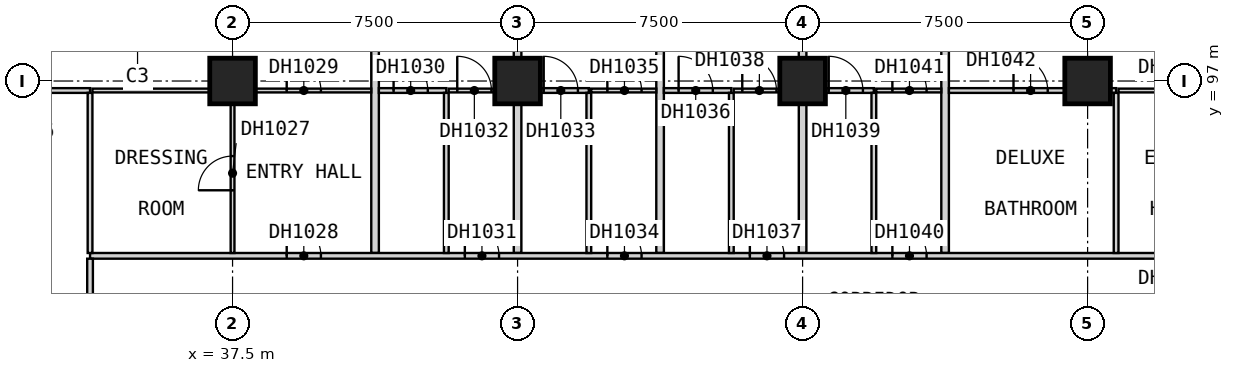
"""IFC4 building model, lengths in metres.
Left out: names, types, materials, properties, quantities, classifications, styles, units other than length and angle.
Written with IfcOpenShell. Run it as: python <this file> out.ifc"""

import sys

from ifc_helpers import new_model, si_unit, direction, frame, frame_2d, origin, origin_2d, place, context, subcontext, project, spatial, rectangle, extrude, element, fill, save


model = new_model("IFC4")
c1 = context("Model", 3, precision=1e-05, world=origin(), true_north=direction((0.0, 1.0)))
c2 = subcontext(c1, "Body", "Model", "MODEL_VIEW")
j1 = project(units=[si_unit("LENGTHUNIT", "METRE"), si_unit("PLANEANGLEUNIT", "RADIAN")], contexts=[c1])
p1 = place(None, origin())
s1 = spatial("IfcSite", under=j1, at=p1, CompositionType="ELEMENT")
p2 = place(p1, origin())
s2 = spatial("IfcBuilding", under=s1, at=p2, CompositionType="ELEMENT")
p3 = place(p2, frame((0.0, 0.0, 34.0)))
s3 = spatial("IfcBuildingStorey", under=s2, at=p3, CompositionType="ELEMENT", Elevation=34.0)
for number, where, z_axis, x_axis in (
    (1, (37.5, 97.0, 0.0), (0.0, 0.0, 1.0), (1.0, 0.0, 0.0)),
    (2, (45.0, 97.0, 0.0), (0.0, 0.0, 1.0), (1.0, 0.0, 0.0)),
    (3, (52.5, 97.0, 0.0), (0.0, 0.0, 1.0), (1.0, 0.0, 0.0)),
    (4, (60.0, 97.0, 0.0), (0.0, 0.0, 1.0), (1.0, 0.0, 0.0)),
):
    element("IfcColumn", number, at=place(p3, frame(where, z_axis=z_axis, x_axis=x_axis)), inside=s3, PredefinedType="COLUMN", context=c2, shape_type="SweptSolid", body=[
        extrude(rectangle(XDim=1.2, YDim=1.2, at=origin_2d()), origin(), (0.0, 0.0, 1.0), 3.6),
    ])
p4 = place(p3, frame((41.25, 92.475, 0.0), z_axis=(0.0, 0.0, 1.0), x_axis=(0.0, 1.0, 0.0)))
e5 = element("IfcWall", 5, at=p4, inside=s3, PredefinedType="PARTITIONING", context=c2, shape_type="SweptSolid", body=[
    extrude(rectangle(XDim=11.715, YDim=0.2, at=frame_2d((5.857, 0.0))), origin(), (0.0, 0.0, 1.0), 3.35),
])
p5 = place(p3, frame((45.0, 92.475, 0.0), z_axis=(0.0, 0.0, 1.0), x_axis=(0.0, 1.0, 0.0)))
e6 = element("IfcWall", 6, at=p5, inside=s3, PredefinedType="PARTITIONING", context=c2, shape_type="SweptSolid", body=[
    extrude(rectangle(XDim=12.525, YDim=0.2, at=frame_2d((6.262, 0.0))), origin(), (0.0, 0.0, 1.0), 3.35),
])
p6 = place(p3, frame((48.75, 92.475, 0.0), z_axis=(0.0, 0.0, 1.0), x_axis=(0.0, 1.0, 0.0)))
e7 = element("IfcWall", 7, at=p6, inside=s3, PredefinedType="PARTITIONING", context=c2, shape_type="SweptSolid", body=[
    extrude(rectangle(XDim=11.715, YDim=0.2, at=frame_2d((5.857, 0.0))), origin(), (0.0, 0.0, 1.0), 3.35),
])
p7 = place(p3, frame((52.5, 92.475, 0.0), z_axis=(0.0, 0.0, 1.0), x_axis=(0.0, 1.0, 0.0)))
e8 = element("IfcWall", 8, at=p7, inside=s3, PredefinedType="PARTITIONING", context=c2, shape_type="SweptSolid", body=[
    extrude(rectangle(XDim=12.525, YDim=0.2, at=frame_2d((6.262, 0.0))), origin(), (0.0, 0.0, 1.0), 3.35),
])
p8 = place(p3, frame((56.25, 92.475, 0.0), z_axis=(0.0, 0.0, 1.0), x_axis=(0.0, 1.0, 0.0)))
e9 = element("IfcWall", 9, at=p8, inside=s3, PredefinedType="PARTITIONING", context=c2, shape_type="SweptSolid", body=[
    extrude(rectangle(XDim=11.715, YDim=0.2, at=frame_2d((5.857, 0.0))), origin(), (0.0, 0.0, 1.0), 3.35),
])
p9 = place(p3, frame((33.75, 92.4, 0.0), z_axis=(0.0, 0.0, 1.0), x_axis=(1.0, 0.0, 0.0)))
e10 = element("IfcWall", 10, at=p9, inside=s3, PredefinedType="PARTITIONING", context=c2, shape_type="SweptSolid", body=[
    extrude(rectangle(XDim=43.65, YDim=0.15, at=frame_2d((21.825, 0.0))), origin(), (0.0, 0.0, 1.0), 3.35),
])
p10 = place(p9, frame((5.175, 0.0, 0.0)))
e11 = element("IfcOpeningElement", 11, at=p10, cuts=e10, PredefinedType="OPENING", context=c2, shape_type="SweptSolid", body=[
    extrude(rectangle(XDim=0.9, YDim=2.1, at=frame_2d((0.45, 1.05))), frame((0.0, 0.085, 0.0), z_axis=(0.0, -1.0, 0.0), x_axis=(1.0, 0.0, 0.0)), (0.0, 0.0, 1.0), 0.17),
])
p11 = place(p9, frame((9.863, 0.0, 0.0)))
e12 = element("IfcOpeningElement", 12, at=p11, cuts=e10, PredefinedType="OPENING", context=c2, shape_type="SweptSolid", body=[
    extrude(rectangle(XDim=0.9, YDim=2.1, at=frame_2d((0.45, 1.05))), frame((0.0, 0.085, 0.0), z_axis=(0.0, -1.0, 0.0), x_axis=(1.0, 0.0, 0.0)), (0.0, 0.0, 1.0), 0.17),
])
p12 = place(p9, frame((13.613, 0.0, 0.0)))
e13 = element("IfcOpeningElement", 13, at=p12, cuts=e10, PredefinedType="OPENING", context=c2, shape_type="SweptSolid", body=[
    extrude(rectangle(XDim=0.9, YDim=2.1, at=frame_2d((0.45, 1.05))), frame((0.0, 0.085, 0.0), z_axis=(0.0, -1.0, 0.0), x_axis=(1.0, 0.0, 0.0)), (0.0, 0.0, 1.0), 0.17),
])
p13 = place(p9, frame((17.363, 0.0, 0.0)))
e14 = element("IfcOpeningElement", 14, at=p13, cuts=e10, PredefinedType="OPENING", context=c2, shape_type="SweptSolid", body=[
    extrude(rectangle(XDim=0.9, YDim=2.1, at=frame_2d((0.45, 1.05))), frame((0.0, 0.085, 0.0), z_axis=(0.0, -1.0, 0.0), x_axis=(1.0, 0.0, 0.0)), (0.0, 0.0, 1.0), 0.17),
])
p14 = place(p9, frame((21.113, 0.0, 0.0)))
e15 = element("IfcOpeningElement", 15, at=p14, cuts=e10, PredefinedType="OPENING", context=c2, shape_type="SweptSolid", body=[
    extrude(rectangle(XDim=0.9, YDim=2.1, at=frame_2d((0.45, 1.05))), frame((0.0, 0.085, 0.0), z_axis=(0.0, -1.0, 0.0), x_axis=(1.0, 0.0, 0.0)), (0.0, 0.0, 1.0), 0.17),
])
p15 = place(p9, frame((28.05, 0.0, 0.0)))
e16 = element("IfcOpeningElement", 16, at=p15, cuts=e10, PredefinedType="OPENING", context=c2, shape_type="SweptSolid", body=[
    extrude(rectangle(XDim=0.9, YDim=2.1, at=frame_2d((0.45, 1.05))), frame((0.0, 0.085, 0.0), z_axis=(0.0, -1.0, 0.0), x_axis=(1.0, 0.0, 0.0)), (0.0, 0.0, 1.0), 0.17),
])
p16 = place(p9, frame((32.363, 0.0, 0.0)))
e17 = element("IfcOpeningElement", 17, at=p16, cuts=e10, PredefinedType="OPENING", context=c2, shape_type="SweptSolid", body=[
    extrude(rectangle(XDim=0.9, YDim=2.1, at=frame_2d((0.45, 1.05))), frame((0.0, 0.085, 0.0), z_axis=(0.0, -1.0, 0.0), x_axis=(1.0, 0.0, 0.0)), (0.0, 0.0, 1.0), 0.17),
])
p17 = place(p9, frame((39.3, 0.0, 0.0)))
e18 = element("IfcOpeningElement", 18, at=p17, cuts=e10, PredefinedType="OPENING", context=c2, shape_type="SweptSolid", body=[
    extrude(rectangle(XDim=0.9, YDim=2.1, at=frame_2d((0.45, 1.05))), frame((0.0, 0.085, 0.0), z_axis=(0.0, -1.0, 0.0), x_axis=(1.0, 0.0, 0.0)), (0.0, 0.0, 1.0), 0.17),
])
p18 = place(p9, frame((42.0, 0.0, 0.0)))
e19 = element("IfcOpeningElement", 19, at=p18, cuts=e10, PredefinedType="OPENING", context=c2, shape_type="SweptSolid", body=[
    extrude(rectangle(XDim=0.9, YDim=2.1, at=frame_2d((0.45, 1.05))), frame((0.0, 0.085, 0.0), z_axis=(0.0, -1.0, 0.0), x_axis=(1.0, 0.0, 0.0)), (0.0, 0.0, 1.0), 0.17),
])
p19 = place(p3, frame((33.75, 90.1, 0.0), z_axis=(0.0, 0.0, 1.0), x_axis=(0.0, 1.0, 0.0)))
e20 = element("IfcWall", 20, at=p19, inside=s3, PredefinedType="PARTITIONING", context=c2, shape_type="SweptSolid", body=[
    extrude(rectangle(XDim=2.225, YDim=0.15, at=frame_2d((1.112, 0.0))), origin(), (0.0, 0.0, 1.0), 3.35),
])
p20 = place(p3, frame((33.812, 96.75, 0.0), z_axis=(0.0, 0.0, 1.0), x_axis=(1.0, 0.0, 0.0)))
e21 = element("IfcWall", 21, at=p20, inside=s3, PredefinedType="PARTITIONING", context=c2, shape_type="SweptSolid", body=[
    extrude(rectangle(XDim=7.337, YDim=0.1, at=frame_2d((3.669, 0.0))), origin(), (0.0, 0.0, 1.0), 3.35),
])
p21 = place(p20, frame((5.113, 0.0, 0.0)))
e22 = element("IfcOpeningElement", 22, at=p21, cuts=e21, PredefinedType="OPENING", context=c2, shape_type="SweptSolid", body=[
    extrude(rectangle(XDim=0.9, YDim=2.1, at=frame_2d((0.45, 1.05))), frame((0.0, 0.06, 0.0), z_axis=(0.0, -1.0, 0.0), x_axis=(1.0, 0.0, 0.0)), (0.0, 0.0, 1.0), 0.12),
])
p22 = place(p3, frame((43.188, 96.75, 0.0), z_axis=(0.0, 0.0, 1.0), x_axis=(1.0, 0.0, 0.0)))
e23 = element("IfcWall", 23, at=p22, inside=s3, PredefinedType="PARTITIONING", context=c2, shape_type="SweptSolid", body=[
    extrude(rectangle(XDim=1.712, YDim=0.1, at=frame_2d((0.856, 0.0))), origin(), (0.0, 0.0, 1.0), 3.35),
])
p23 = place(p22, frame((0.225, 0.0, 0.0)))
e24 = element("IfcOpeningElement", 24, at=p23, cuts=e23, PredefinedType="OPENING", context=c2, shape_type="SweptSolid", body=[
    extrude(rectangle(XDim=0.9, YDim=2.1, at=frame_2d((0.45, 1.05))), frame((0.0, 0.06, 0.0), z_axis=(0.0, -1.0, 0.0), x_axis=(1.0, 0.0, 0.0)), (0.0, 0.0, 1.0), 0.12),
])
p24 = place(p3, frame((46.938, 96.75, 0.0), z_axis=(0.0, 0.0, 1.0), x_axis=(1.0, 0.0, 0.0)))
e25 = element("IfcWall", 25, at=p24, inside=s3, PredefinedType="PARTITIONING", context=c2, shape_type="SweptSolid", body=[
    extrude(rectangle(XDim=1.712, YDim=0.1, at=frame_2d((0.856, 0.0))), origin(), (0.0, 0.0, 1.0), 3.35),
])
p25 = place(p24, frame((0.425, 0.0, 0.0)))
e26 = element("IfcOpeningElement", 26, at=p25, cuts=e25, PredefinedType="OPENING", context=c2, shape_type="SweptSolid", body=[
    extrude(rectangle(XDim=0.9, YDim=2.1, at=frame_2d((0.45, 1.05))), frame((0.0, 0.06, 0.0), z_axis=(0.0, -1.0, 0.0), x_axis=(1.0, 0.0, 0.0)), (0.0, 0.0, 1.0), 0.12),
])
p26 = place(p3, frame((50.688, 96.75, 0.0), z_axis=(0.0, 0.0, 1.0), x_axis=(1.0, 0.0, 0.0)))
e27 = element("IfcWall", 27, at=p26, inside=s3, PredefinedType="PARTITIONING", context=c2, shape_type="SweptSolid", body=[
    extrude(rectangle(XDim=1.712, YDim=0.1, at=frame_2d((0.856, 0.0))), origin(), (0.0, 0.0, 1.0), 3.35),
])
p27 = place(p26, frame((0.225, 0.0, 0.0)))
e28 = element("IfcOpeningElement", 28, at=p27, cuts=e27, PredefinedType="OPENING", context=c2, shape_type="SweptSolid", body=[
    extrude(rectangle(XDim=0.9, YDim=2.1, at=frame_2d((0.45, 1.05))), frame((0.0, 0.06, 0.0), z_axis=(0.0, -1.0, 0.0), x_axis=(1.0, 0.0, 0.0)), (0.0, 0.0, 1.0), 0.12),
])
p28 = place(p3, frame((54.438, 96.75, 0.0), z_axis=(0.0, 0.0, 1.0), x_axis=(1.0, 0.0, 0.0)))
e29 = element("IfcWall", 29, at=p28, inside=s3, PredefinedType="PARTITIONING", context=c2, shape_type="SweptSolid", body=[
    extrude(rectangle(XDim=1.712, YDim=0.1, at=frame_2d((0.856, 0.0))), origin(), (0.0, 0.0, 1.0), 3.35),
])
p29 = place(p28, frame((0.425, 0.0, 0.0)))
e30 = element("IfcOpeningElement", 30, at=p29, cuts=e29, PredefinedType="OPENING", context=c2, shape_type="SweptSolid", body=[
    extrude(rectangle(XDim=0.9, YDim=2.1, at=frame_2d((0.45, 1.05))), frame((0.0, 0.06, 0.0), z_axis=(0.0, -1.0, 0.0), x_axis=(1.0, 0.0, 0.0)), (0.0, 0.0, 1.0), 0.12),
])
p30 = place(p3, frame((60.812, 96.75, 0.0), z_axis=(0.0, 0.0, 1.0), x_axis=(1.0, 0.0, 0.0)))
e31 = element("IfcWall", 31, at=p30, inside=s3, PredefinedType="PARTITIONING", context=c2, shape_type="SweptSolid", body=[
    extrude(rectangle(XDim=2.837, YDim=0.1, at=frame_2d((1.419, 0.0))), origin(), (0.0, 0.0, 1.0), 3.35),
])
p31 = place(p30, frame((0.988, 0.0, 0.0)))
e32 = element("IfcOpeningElement", 32, at=p31, cuts=e31, PredefinedType="OPENING", context=c2, shape_type="SweptSolid", body=[
    extrude(rectangle(XDim=0.9, YDim=2.1, at=frame_2d((0.45, 1.05))), frame((0.0, 0.06, 0.0), z_axis=(0.0, -1.0, 0.0), x_axis=(1.0, 0.0, 0.0)), (0.0, 0.0, 1.0), 0.12),
])
p32 = place(p3, frame((37.5, 92.475, 0.0), z_axis=(0.0, 0.0, 1.0), x_axis=(0.0, 1.0, 0.0)))
e33 = element("IfcWall", 33, at=p32, inside=s3, PredefinedType="PARTITIONING", context=c2, shape_type="SweptSolid", body=[
    extrude(rectangle(XDim=4.225, YDim=0.1, at=frame_2d((2.112, 0.0))), origin(), (0.0, 0.0, 1.0), 3.35),
])
p33 = place(p32, frame((1.65, 0.0, 0.0)))
e34 = element("IfcOpeningElement", 34, at=p33, cuts=e33, PredefinedType="OPENING", context=c2, shape_type="SweptSolid", body=[
    extrude(rectangle(XDim=0.9, YDim=2.1, at=frame_2d((0.45, 1.05))), frame((0.0, 0.06, 0.0), z_axis=(0.0, -1.0, 0.0), x_axis=(1.0, 0.0, 0.0)), (0.0, 0.0, 1.0), 0.12),
])
p34 = place(p3, frame((30.0, 96.75, 0.0), z_axis=(0.0, 0.0, 1.0), x_axis=(1.0, 0.0, 0.0)))
e35 = element("IfcWall", 35, at=p34, inside=s3, PredefinedType="PARTITIONING", context=c2, shape_type="SweptSolid", body=[
    extrude(rectangle(XDim=3.75, YDim=0.125, at=frame_2d((1.875, 0.0))), origin(), (0.0, 0.0, 1.0), 3.35),
])
p35 = place(p34, frame((1.425, 0.0, 0.0)))
e36 = element("IfcOpeningElement", 36, at=p35, cuts=e35, PredefinedType="OPENING", context=c2, shape_type="SweptSolid", body=[
    extrude(rectangle(XDim=0.9, YDim=2.1, at=frame_2d((0.45, 1.05))), frame((0.0, 0.073, 0.0), z_axis=(0.0, -1.0, 0.0), x_axis=(1.0, 0.0, 0.0)), (0.0, 0.0, 1.0), 0.145),
])
p36 = place(p3, frame((41.35, 96.75, 0.0), z_axis=(0.0, 0.0, 1.0), x_axis=(1.0, 0.0, 0.0)))
e37 = element("IfcWall", 37, at=p36, inside=s3, PredefinedType="PARTITIONING", context=c2, shape_type="SweptSolid", body=[
    extrude(rectangle(XDim=1.775, YDim=0.125, at=frame_2d((0.887, 0.0))), origin(), (0.0, 0.0, 1.0), 3.35),
])
p37 = place(p36, frame((0.387, 0.0, 0.0)))
e38 = element("IfcOpeningElement", 38, at=p37, cuts=e37, PredefinedType="OPENING", context=c2, shape_type="SweptSolid", body=[
    extrude(rectangle(XDim=0.9, YDim=2.1, at=frame_2d((0.45, 1.05))), frame((0.0, 0.073, 0.0), z_axis=(0.0, -1.0, 0.0), x_axis=(1.0, 0.0, 0.0)), (0.0, 0.0, 1.0), 0.145),
])
p38 = place(p3, frame((45.1, 96.75, 0.0), z_axis=(0.0, 0.0, 1.0), x_axis=(1.0, 0.0, 0.0)))
e39 = element("IfcWall", 39, at=p38, inside=s3, PredefinedType="PARTITIONING", context=c2, shape_type="SweptSolid", body=[
    extrude(rectangle(XDim=1.775, YDim=0.125, at=frame_2d((0.887, 0.0))), origin(), (0.0, 0.0, 1.0), 3.35),
])
p39 = place(p38, frame((0.587, 0.0, 0.0)))
e40 = element("IfcOpeningElement", 40, at=p39, cuts=e39, PredefinedType="OPENING", context=c2, shape_type="SweptSolid", body=[
    extrude(rectangle(XDim=0.9, YDim=2.1, at=frame_2d((0.45, 1.05))), frame((0.0, 0.073, 0.0), z_axis=(0.0, -1.0, 0.0), x_axis=(1.0, 0.0, 0.0)), (0.0, 0.0, 1.0), 0.145),
])
p40 = place(p3, frame((48.85, 96.75, 0.0), z_axis=(0.0, 0.0, 1.0), x_axis=(1.0, 0.0, 0.0)))
e41 = element("IfcWall", 41, at=p40, inside=s3, PredefinedType="PARTITIONING", context=c2, shape_type="SweptSolid", body=[
    extrude(rectangle(XDim=1.775, YDim=0.125, at=frame_2d((0.887, 0.0))), origin(), (0.0, 0.0, 1.0), 3.35),
])
p41 = place(p40, frame((0.387, 0.0, 0.0)))
e42 = element("IfcOpeningElement", 42, at=p41, cuts=e41, PredefinedType="OPENING", context=c2, shape_type="SweptSolid", body=[
    extrude(rectangle(XDim=0.9, YDim=2.1, at=frame_2d((0.45, 1.05))), frame((0.0, 0.073, 0.0), z_axis=(0.0, -1.0, 0.0), x_axis=(1.0, 0.0, 0.0)), (0.0, 0.0, 1.0), 0.145),
])
p42 = place(p3, frame((52.6, 96.75, 0.0), z_axis=(0.0, 0.0, 1.0), x_axis=(1.0, 0.0, 0.0)))
e43 = element("IfcWall", 43, at=p42, inside=s3, PredefinedType="PARTITIONING", context=c2, shape_type="SweptSolid", body=[
    extrude(rectangle(XDim=1.775, YDim=0.125, at=frame_2d((0.887, 0.0))), origin(), (0.0, 0.0, 1.0), 3.35),
])
p43 = place(p42, frame((0.587, 0.0, 0.0)))
e44 = element("IfcOpeningElement", 44, at=p43, cuts=e43, PredefinedType="OPENING", context=c2, shape_type="SweptSolid", body=[
    extrude(rectangle(XDim=0.9, YDim=2.1, at=frame_2d((0.45, 1.05))), frame((0.0, 0.073, 0.0), z_axis=(0.0, -1.0, 0.0), x_axis=(1.0, 0.0, 0.0)), (0.0, 0.0, 1.0), 0.145),
])
p44 = place(p3, frame((56.35, 96.75, 0.0), z_axis=(0.0, 0.0, 1.0), x_axis=(1.0, 0.0, 0.0)))
e45 = element("IfcWall", 45, at=p44, inside=s3, PredefinedType="PARTITIONING", context=c2, shape_type="SweptSolid", body=[
    extrude(rectangle(XDim=4.4, YDim=0.125, at=frame_2d((2.2, 0.0))), origin(), (0.0, 0.0, 1.0), 3.35),
])
p45 = place(p44, frame((1.7, 0.0, 0.0)))
e46 = element("IfcOpeningElement", 46, at=p45, cuts=e45, PredefinedType="OPENING", context=c2, shape_type="SweptSolid", body=[
    extrude(rectangle(XDim=0.9, YDim=2.1, at=frame_2d((0.45, 1.05))), frame((0.0, 0.073, 0.0), z_axis=(0.0, -1.0, 0.0), x_axis=(1.0, 0.0, 0.0)), (0.0, 0.0, 1.0), 0.145),
])
for number, where, z_axis, x_axis in (
    (47, (33.75, 92.475, 0.0), (0.0, 0.0, 1.0), (0.0, 1.0, 0.0)),
    (48, (43.125, 92.475, 0.0), (0.0, 0.0, 1.0), (0.0, 1.0, 0.0)),
    (49, (46.875, 92.475, 0.0), (0.0, 0.0, 1.0), (0.0, 1.0, 0.0)),
    (50, (50.625, 92.475, 0.0), (0.0, 0.0, 1.0), (0.0, 1.0, 0.0)),
    (51, (54.375, 92.475, 0.0), (0.0, 0.0, 1.0), (0.0, 1.0, 0.0)),
    (52, (60.75, 92.475, 0.0), (0.0, 0.0, 1.0), (0.0, 1.0, 0.0)),
):
    element("IfcWall", number, at=place(p3, frame(where, z_axis=z_axis, x_axis=x_axis)), inside=s3, PredefinedType="PARTITIONING", context=c2, shape_type="SweptSolid", body=[
        extrude(rectangle(XDim=4.212, YDim=0.125, at=frame_2d((2.106, 0.0))), origin(), (0.0, 0.0, 1.0), 3.35),
    ])
p46 = place(p33, origin())
e53 = element("IfcDoor", 53, at=p46, inside=s3, OperationType="SINGLE_SWING_RIGHT", PredefinedType="DOOR", context=c2, shape_type="SweptSolid", body=[
    extrude(rectangle(XDim=0.9, YDim=2.1, at=frame_2d((0.45, 1.05))), frame((0.0, 0.025, 0.0), z_axis=(0.0, -1.0, 0.0), x_axis=(1.0, 0.0, 0.0)), (0.0, 0.0, 1.0), 0.05),
])
fill(e34, e53)
p47 = place(p10, origin())
e54 = element("IfcDoor", 54, at=p47, inside=s3, OperationType="SINGLE_SWING_LEFT", PredefinedType="DOOR", context=c2, shape_type="SweptSolid", body=[
    extrude(rectangle(XDim=0.9, YDim=2.1, at=frame_2d((0.45, 1.05))), frame((0.0, 0.025, 0.0), z_axis=(0.0, -1.0, 0.0), x_axis=(1.0, 0.0, 0.0)), (0.0, 0.0, 1.0), 0.05),
])
fill(e11, e54)
p48 = place(p21, origin())
e55 = element("IfcDoor", 55, at=p48, inside=s3, OperationType="SINGLE_SWING_RIGHT", PredefinedType="DOOR", context=c2, shape_type="SweptSolid", body=[
    extrude(rectangle(XDim=0.9, YDim=2.1, at=frame_2d((0.45, 1.05))), frame((0.0, 0.025, 0.0), z_axis=(0.0, -1.0, 0.0), x_axis=(1.0, 0.0, 0.0)), (0.0, 0.0, 1.0), 0.05),
])
fill(e22, e55)
p49 = place(p37, origin())
e56 = element("IfcDoor", 56, at=p49, inside=s3, OperationType="SINGLE_SWING_RIGHT", PredefinedType="DOOR", context=c2, shape_type="SweptSolid", body=[
    extrude(rectangle(XDim=0.9, YDim=2.1, at=frame_2d((0.45, 1.05))), frame((0.0, 0.025, 0.0), z_axis=(0.0, -1.0, 0.0), x_axis=(1.0, 0.0, 0.0)), (0.0, 0.0, 1.0), 0.05),
])
fill(e38, e56)
p50 = place(p11, origin())
e57 = element("IfcDoor", 57, at=p50, inside=s3, OperationType="SINGLE_SWING_LEFT", PredefinedType="DOOR", context=c2, shape_type="SweptSolid", body=[
    extrude(rectangle(XDim=0.9, YDim=2.1, at=frame_2d((0.45, 1.05))), frame((0.0, 0.025, 0.0), z_axis=(0.0, -1.0, 0.0), x_axis=(1.0, 0.0, 0.0)), (0.0, 0.0, 1.0), 0.05),
])
fill(e12, e57)
p51 = place(p23, origin())
e58 = element("IfcDoor", 58, at=p51, inside=s3, OperationType="SINGLE_SWING_RIGHT", PredefinedType="DOOR", context=c2, shape_type="SweptSolid", body=[
    extrude(rectangle(XDim=0.9, YDim=2.1, at=frame_2d((0.45, 1.05))), frame((0.0, 0.025, 0.0), z_axis=(0.0, -1.0, 0.0), x_axis=(1.0, 0.0, 0.0)), (0.0, 0.0, 1.0), 0.05),
])
fill(e24, e58)
p52 = place(p39, origin())
e59 = element("IfcDoor", 59, at=p52, inside=s3, OperationType="SINGLE_SWING_LEFT", PredefinedType="DOOR", context=c2, shape_type="SweptSolid", body=[
    extrude(rectangle(XDim=0.9, YDim=2.1, at=frame_2d((0.45, 1.05))), frame((0.0, 0.025, 0.0), z_axis=(0.0, -1.0, 0.0), x_axis=(1.0, 0.0, 0.0)), (0.0, 0.0, 1.0), 0.05),
])
fill(e40, e59)
p53 = place(p12, origin())
e60 = element("IfcDoor", 60, at=p53, inside=s3, OperationType="SINGLE_SWING_LEFT", PredefinedType="DOOR", context=c2, shape_type="SweptSolid", body=[
    extrude(rectangle(XDim=0.9, YDim=2.1, at=frame_2d((0.45, 1.05))), frame((0.0, 0.025, 0.0), z_axis=(0.0, -1.0, 0.0), x_axis=(1.0, 0.0, 0.0)), (0.0, 0.0, 1.0), 0.05),
])
fill(e13, e60)
p54 = place(p25, origin())
e61 = element("IfcDoor", 61, at=p54, inside=s3, OperationType="SINGLE_SWING_RIGHT", PredefinedType="DOOR", context=c2, shape_type="SweptSolid", body=[
    extrude(rectangle(XDim=0.9, YDim=2.1, at=frame_2d((0.45, 1.05))), frame((0.0, 0.025, 0.0), z_axis=(0.0, -1.0, 0.0), x_axis=(1.0, 0.0, 0.0)), (0.0, 0.0, 1.0), 0.05),
])
fill(e26, e61)
p55 = place(p41, origin())
e62 = element("IfcDoor", 62, at=p55, inside=s3, OperationType="SINGLE_SWING_RIGHT", PredefinedType="DOOR", context=c2, shape_type="SweptSolid", body=[
    extrude(rectangle(XDim=0.9, YDim=2.1, at=frame_2d((0.45, 1.05))), frame((0.0, 0.025, 0.0), z_axis=(0.0, -1.0, 0.0), x_axis=(1.0, 0.0, 0.0)), (0.0, 0.0, 1.0), 0.05),
])
fill(e42, e62)
p56 = place(p13, origin())
e63 = element("IfcDoor", 63, at=p56, inside=s3, OperationType="SINGLE_SWING_LEFT", PredefinedType="DOOR", context=c2, shape_type="SweptSolid", body=[
    extrude(rectangle(XDim=0.9, YDim=2.1, at=frame_2d((0.45, 1.05))), frame((0.0, 0.025, 0.0), z_axis=(0.0, -1.0, 0.0), x_axis=(1.0, 0.0, 0.0)), (0.0, 0.0, 1.0), 0.05),
])
fill(e14, e63)
p57 = place(p27, origin())
e64 = element("IfcDoor", 64, at=p57, inside=s3, OperationType="SINGLE_SWING_RIGHT", PredefinedType="DOOR", context=c2, shape_type="SweptSolid", body=[
    extrude(rectangle(XDim=0.9, YDim=2.1, at=frame_2d((0.45, 1.05))), frame((0.0, 0.025, 0.0), z_axis=(0.0, -1.0, 0.0), x_axis=(1.0, 0.0, 0.0)), (0.0, 0.0, 1.0), 0.05),
])
fill(e28, e64)
p58 = place(p43, origin())
e65 = element("IfcDoor", 65, at=p58, inside=s3, OperationType="SINGLE_SWING_LEFT", PredefinedType="DOOR", context=c2, shape_type="SweptSolid", body=[
    extrude(rectangle(XDim=0.9, YDim=2.1, at=frame_2d((0.45, 1.05))), frame((0.0, 0.025, 0.0), z_axis=(0.0, -1.0, 0.0), x_axis=(1.0, 0.0, 0.0)), (0.0, 0.0, 1.0), 0.05),
])
fill(e44, e65)
p59 = place(p14, origin())
e66 = element("IfcDoor", 66, at=p59, inside=s3, OperationType="SINGLE_SWING_LEFT", PredefinedType="DOOR", context=c2, shape_type="SweptSolid", body=[
    extrude(rectangle(XDim=0.9, YDim=2.1, at=frame_2d((0.45, 1.05))), frame((0.0, 0.025, 0.0), z_axis=(0.0, -1.0, 0.0), x_axis=(1.0, 0.0, 0.0)), (0.0, 0.0, 1.0), 0.05),
])
fill(e15, e66)
p60 = place(p29, origin())
e67 = element("IfcDoor", 67, at=p60, inside=s3, OperationType="SINGLE_SWING_RIGHT", PredefinedType="DOOR", context=c2, shape_type="SweptSolid", body=[
    extrude(rectangle(XDim=0.9, YDim=2.1, at=frame_2d((0.45, 1.05))), frame((0.0, 0.025, 0.0), z_axis=(0.0, -1.0, 0.0), x_axis=(1.0, 0.0, 0.0)), (0.0, 0.0, 1.0), 0.05),
])
fill(e30, e67)
p61 = place(p45, origin())
e68 = element("IfcDoor", 68, at=p61, inside=s3, OperationType="SINGLE_SWING_RIGHT", PredefinedType="DOOR", context=c2, shape_type="SweptSolid", body=[
    extrude(rectangle(XDim=0.9, YDim=2.1, at=frame_2d((0.45, 1.05))), frame((0.0, 0.025, 0.0), z_axis=(0.0, -1.0, 0.0), x_axis=(1.0, 0.0, 0.0)), (0.0, 0.0, 1.0), 0.05),
])
fill(e46, e68)
save(model, sys.argv[1])
